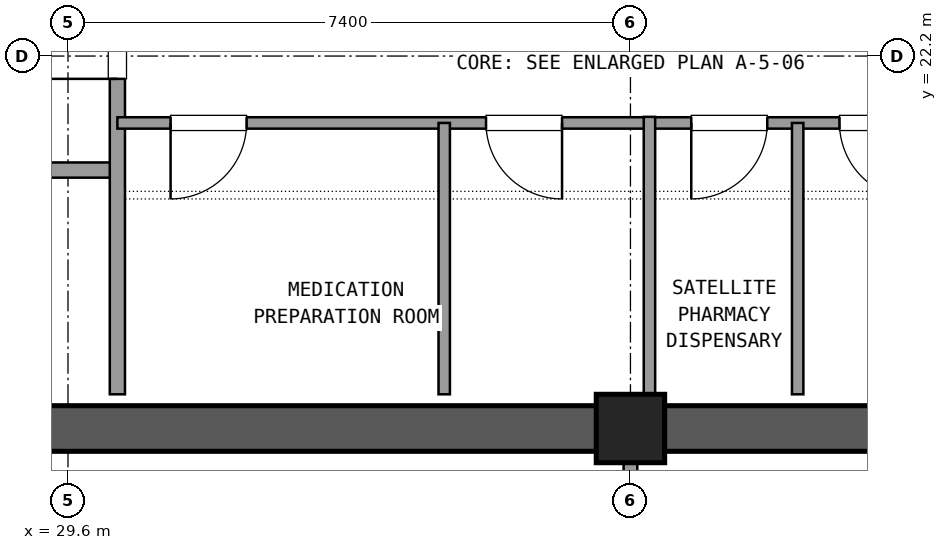
"""IFC4 building model, lengths in metres.
Left out: names, types, materials, properties, quantities, classifications, styles, units other than length and angle.
Written with IfcOpenShell. Run it as: python <this file> out.ifc"""

import sys

from ifc_helpers import new_model, si_unit, direction, frame, frame_2d, origin, origin_2d, place, context, subcontext, project, spatial, rectangle, extrude, element, fill, save


model = new_model("IFC4")
c1 = context("Model", 3, precision=1e-05, world=origin(), true_north=direction((0.0, 1.0)))
c2 = subcontext(c1, "Body", "Model", "MODEL_VIEW")
j1 = project(units=[si_unit("LENGTHUNIT", "METRE"), si_unit("PLANEANGLEUNIT", "RADIAN")], contexts=[c1])
p1 = place(None, origin())
s1 = spatial("IfcSite", under=j1, at=p1, CompositionType="ELEMENT")
p2 = place(p1, origin())
s2 = spatial("IfcBuilding", under=s1, at=p2, CompositionType="ELEMENT")
p3 = place(p2, frame((0.0, 0.0, 210.78)))
s3 = spatial("IfcBuildingStorey", under=s2, at=p3, CompositionType="ELEMENT", Elevation=210.78)
p4 = place(p3, frame((37.0, 17.3, 0.0), z_axis=(0.0, 0.0, 1.0), x_axis=(1.0, 0.0, 0.0)))
e1 = element("IfcColumn", 1, at=p4, inside=s3, PredefinedType="COLUMN", context=c2, shape_type="SweptSolid", body=[
    extrude(rectangle(XDim=0.9, YDim=0.9, at=origin_2d()), origin(), (0.0, 0.0, 1.0), 3.6),
])
for number, where, z_axis, x_axis in (
    (2, (26.245, 17.3, 0.0), (0.0, 0.0, 1.0), (1.0, 0.0, 0.0)),
    (3, (37.445, 17.3, 0.0), (0.0, 0.0, 1.0), (1.0, 0.0, 0.0)),
):
    element("IfcWall", number, at=place(p3, frame(where, z_axis=z_axis, x_axis=x_axis)), inside=s3, PredefinedType="SHEAR", context=c2, shape_type="SweptSolid", body=[
        extrude(rectangle(XDim=10.31, YDim=0.6, at=frame_2d((5.155, 0.0))), origin(), (0.0, 0.0, 1.0), 3.32),
    ])
p5 = place(p3, frame((26.25, 20.7, 0.0), z_axis=(0.0, 0.0, 1.0), x_axis=(1.0, 0.0, 0.0)))
e4 = element("IfcWall", 4, at=p5, inside=s3, PredefinedType="SOLIDWALL", context=c2, shape_type="SweptSolid", body=[
    extrude(rectangle(XDim=4.0, YDim=0.2, at=frame_2d((2.0, 0.0))), origin(), (0.0, 0.0, 1.0), 2.61),
])
p6 = place(p5, frame((0.65, 0.0, 0.0)))
e5 = element("IfcOpeningElement", 5, at=p6, cuts=e4, PredefinedType="OPENING", context=c2, shape_type="SweptSolid", body=[
    extrude(rectangle(XDim=1.2, YDim=2.15, at=frame_2d((0.6, 1.075))), frame((0.0, 0.11, 0.0), z_axis=(0.0, -1.0, 0.0), x_axis=(1.0, 0.0, 0.0)), (0.0, 0.0, 1.0), 0.22),
])
p7 = place(p3, frame((30.25, 17.75, 0.0), z_axis=(0.0, 0.0, 1.0), x_axis=(0.0, 1.0, 0.0)))
e6 = element("IfcWall", 6, at=p7, inside=s3, PredefinedType="SOLIDWALL", context=c2, shape_type="SweptSolid", body=[
    extrude(rectangle(XDim=6.9, YDim=0.2, at=frame_2d((3.45, 0.0))), origin(), (0.0, 0.0, 1.0), 2.61),
])
p8 = place(p7, frame((4.15, 0.0, 0.0)))
e7 = element("IfcOpeningElement", 7, at=p8, cuts=e6, PredefinedType="OPENING", context=c2, shape_type="SweptSolid", body=[
    extrude(rectangle(XDim=1.2, YDim=2.15, at=frame_2d((0.6, 1.075))), frame((0.0, 0.11, 0.0), z_axis=(0.0, -1.0, 0.0), x_axis=(1.0, 0.0, 0.0)), (0.0, 0.0, 1.0), 0.22),
])
p9 = place(p3, frame((30.25, 21.32, 0.0), z_axis=(0.0, 0.0, 1.0), x_axis=(1.0, 0.0, 0.0)))
e8 = element("IfcWall", 8, at=p9, inside=s3, PredefinedType="PARTITIONING", context=c2, shape_type="SweptSolid", body=[
    extrude(rectangle(XDim=7.0, YDim=0.15, at=frame_2d((3.5, 0.0))), origin(), (0.0, 0.0, 1.0), 2.61),
])
p10 = place(p9, frame((0.7, 0.0, 0.0)))
e9 = element("IfcOpeningElement", 9, at=p10, cuts=e8, PredefinedType="OPENING", context=c2, shape_type="SweptSolid", body=[
    extrude(rectangle(XDim=1.0, YDim=2.15, at=frame_2d((0.5, 1.075))), frame((0.0, 0.085, 0.0), z_axis=(0.0, -1.0, 0.0), x_axis=(1.0, 0.0, 0.0)), (0.0, 0.0, 1.0), 0.17),
])
p11 = place(p9, frame((4.85, 0.0, 0.0)))
e10 = element("IfcOpeningElement", 10, at=p11, cuts=e8, PredefinedType="OPENING", context=c2, shape_type="SweptSolid", body=[
    extrude(rectangle(XDim=1.0, YDim=2.15, at=frame_2d((0.5, 1.075))), frame((0.0, 0.085, 0.0), z_axis=(0.0, -1.0, 0.0), x_axis=(1.0, 0.0, 0.0)), (0.0, 0.0, 1.0), 0.17),
])
p12 = place(p3, frame((34.55, 17.75, 0.0), z_axis=(0.0, 0.0, 1.0), x_axis=(0.0, 1.0, 0.0)))
e11 = element("IfcWall", 11, at=p12, inside=s3, PredefinedType="PARTITIONING", context=c2, shape_type="SweptSolid", body=[
    extrude(rectangle(XDim=3.57, YDim=0.15, at=frame_2d((1.785, 0.0))), origin(), (0.0, 0.0, 1.0), 2.61),
])
p13 = place(p3, frame((37.25, 21.32, 0.0), z_axis=(0.0, 0.0, 1.0), x_axis=(1.0, 0.0, 0.0)))
e12 = element("IfcWall", 12, at=p13, inside=s3, PredefinedType="PARTITIONING", context=c2, shape_type="SweptSolid", body=[
    extrude(rectangle(XDim=6.1, YDim=0.15, at=frame_2d((3.05, 0.0))), origin(), (0.0, 0.0, 1.0), 2.61),
])
p14 = place(p13, frame((0.55, 0.0, 0.0)))
e13 = element("IfcOpeningElement", 13, at=p14, cuts=e12, PredefinedType="OPENING", context=c2, shape_type="SweptSolid", body=[
    extrude(rectangle(XDim=1.0, YDim=2.15, at=frame_2d((0.5, 1.075))), frame((0.0, 0.085, 0.0), z_axis=(0.0, -1.0, 0.0), x_axis=(1.0, 0.0, 0.0)), (0.0, 0.0, 1.0), 0.17),
])
p15 = place(p13, frame((2.5, 0.0, 0.0)))
e14 = element("IfcOpeningElement", 14, at=p15, cuts=e12, PredefinedType="OPENING", context=c2, shape_type="SweptSolid", body=[
    extrude(rectangle(XDim=1.0, YDim=2.15, at=frame_2d((0.5, 1.075))), frame((0.0, 0.085, 0.0), z_axis=(0.0, -1.0, 0.0), x_axis=(1.0, 0.0, 0.0)), (0.0, 0.0, 1.0), 0.17),
])
p16 = place(p3, frame((39.2, 17.75, 0.0), z_axis=(0.0, 0.0, 1.0), x_axis=(0.0, 1.0, 0.0)))
e15 = element("IfcWall", 15, at=p16, inside=s3, PredefinedType="PARTITIONING", context=c2, shape_type="SweptSolid", body=[
    extrude(rectangle(XDim=3.57, YDim=0.15, at=frame_2d((1.785, 0.0))), origin(), (0.0, 0.0, 1.0), 2.61),
])
p17 = place(p3, frame((37.25, 17.75, 0.0), z_axis=(0.0, 0.0, 1.0), x_axis=(0.0, 1.0, 0.0)))
e16 = element("IfcWall", 16, at=p17, inside=s3, PredefinedType="PARTITIONING", context=c2, shape_type="SweptSolid", body=[
    extrude(rectangle(XDim=3.65, YDim=0.15, at=frame_2d((1.825, 0.0))), origin(), (0.0, 0.0, 1.0), 2.61),
])
p18 = place(p3, frame((37.0, 14.15, 0.0), z_axis=(0.0, 0.0, 1.0), x_axis=(0.0, 1.0, 0.0)))
e17 = element("IfcWall", 17, at=p18, inside=s3, PredefinedType="PARTITIONING", context=c2, shape_type="SweptSolid", body=[
    extrude(rectangle(XDim=2.7, YDim=0.18, at=frame_2d((1.35, 0.0))), origin(), (0.0, 0.0, 1.0), 2.61),
])
p19 = place(p18, frame((0.35, 0.0, 0.0)))
e18 = element("IfcOpeningElement", 18, at=p19, cuts=e17, PredefinedType="OPENING", context=c2, shape_type="SweptSolid", body=[
    extrude(rectangle(XDim=2.0, YDim=2.2, at=frame_2d((1.0, 1.1))), frame((0.0, 0.1, 0.0), z_axis=(0.0, -1.0, 0.0), x_axis=(1.0, 0.0, 0.0)), (0.0, 0.0, 1.0), 0.2),
])
p20 = place(p8, origin())
e19 = element("IfcDoor", 19, at=p20, inside=s3, OperationType="SINGLE_SWING_LEFT", PredefinedType="DOOR", context=c2, shape_type="SweptSolid", body=[
    extrude(rectangle(XDim=1.2, YDim=2.15, at=frame_2d((0.6, 1.075))), frame((0.0, 0.025, 0.0), z_axis=(0.0, -1.0, 0.0), x_axis=(1.0, 0.0, 0.0)), (0.0, 0.0, 1.0), 0.05),
])
fill(e7, e19)
p21 = place(p10, frame((1.0, 0.0, 0.0), z_axis=(0.0, 0.0, 1.0), x_axis=(-1.0, 0.0, 0.0)))
e20 = element("IfcDoor", 20, at=p21, inside=s3, OperationType="SINGLE_SWING_LEFT", PredefinedType="DOOR", context=c2, shape_type="SweptSolid", body=[
    extrude(rectangle(XDim=1.0, YDim=2.15, at=frame_2d((0.5, 1.075))), frame((0.0, 0.025, 0.0), z_axis=(0.0, -1.0, 0.0), x_axis=(1.0, 0.0, 0.0)), (0.0, 0.0, 1.0), 0.05),
])
fill(e9, e20)
p22 = place(p11, frame((1.0, 0.0, 0.0), z_axis=(0.0, 0.0, 1.0), x_axis=(-1.0, 0.0, 0.0)))
e21 = element("IfcDoor", 21, at=p22, inside=s3, OperationType="SINGLE_SWING_RIGHT", PredefinedType="DOOR", context=c2, shape_type="SweptSolid", body=[
    extrude(rectangle(XDim=1.0, YDim=2.15, at=frame_2d((0.5, 1.075))), frame((0.0, 0.025, 0.0), z_axis=(0.0, -1.0, 0.0), x_axis=(1.0, 0.0, 0.0)), (0.0, 0.0, 1.0), 0.05),
])
fill(e10, e21)
p23 = place(p14, frame((1.0, 0.0, 0.0), z_axis=(0.0, 0.0, 1.0), x_axis=(-1.0, 0.0, 0.0)))
e22 = element("IfcDoor", 22, at=p23, inside=s3, OperationType="SINGLE_SWING_LEFT", PredefinedType="DOOR", context=c2, shape_type="SweptSolid", body=[
    extrude(rectangle(XDim=1.0, YDim=2.15, at=frame_2d((0.5, 1.075))), frame((0.0, 0.025, 0.0), z_axis=(0.0, -1.0, 0.0), x_axis=(1.0, 0.0, 0.0)), (0.0, 0.0, 1.0), 0.05),
])
fill(e13, e22)
p24 = place(p15, frame((1.0, 0.0, 0.0), z_axis=(0.0, 0.0, 1.0), x_axis=(-1.0, 0.0, 0.0)))
e23 = element("IfcDoor", 23, at=p24, inside=s3, OperationType="SINGLE_SWING_RIGHT", PredefinedType="DOOR", context=c2, shape_type="SweptSolid", body=[
    extrude(rectangle(XDim=1.0, YDim=2.15, at=frame_2d((0.5, 1.075))), frame((0.0, 0.025, 0.0), z_axis=(0.0, -1.0, 0.0), x_axis=(1.0, 0.0, 0.0)), (0.0, 0.0, 1.0), 0.05),
])
fill(e14, e23)
save(model, sys.argv[1])
